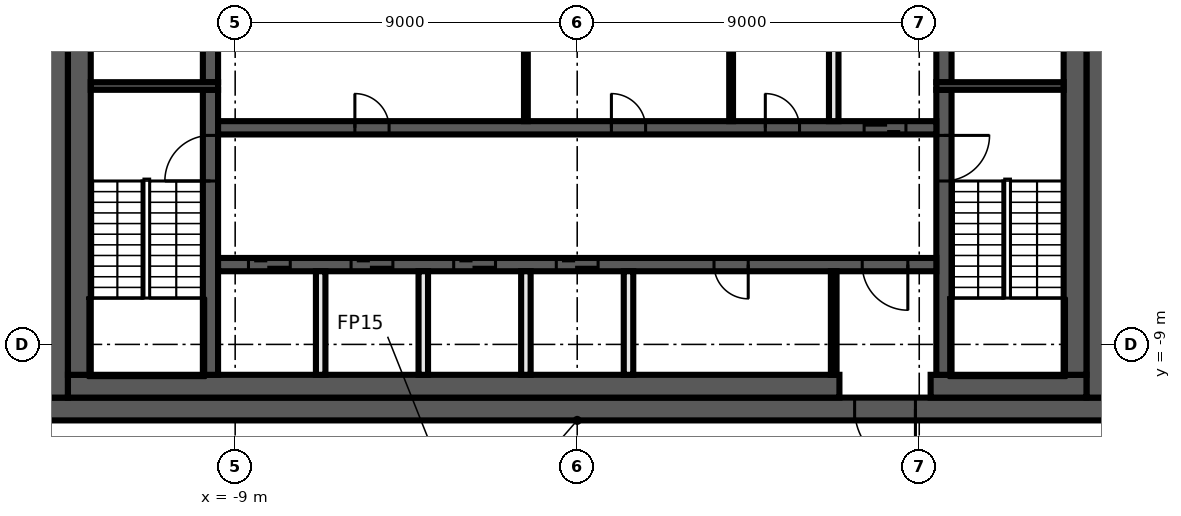
"""IFC4 building model, lengths in metres.
Left out: names, types, materials, properties, quantities, classifications, styles, units other than length and angle.
Written with IfcOpenShell. Run it as: python <this file> out.ifc"""

import sys

from ifc_helpers import new_model, si_unit, direction, frame, frame_2d, origin, place, context, subcontext, project, spatial, rectangle, extrude, element, fill, save


model = new_model("IFC4")
c1 = context("Model", 3, precision=1e-05, world=origin(), true_north=direction((0.0, 1.0)))
c2 = subcontext(c1, "Body", "Model", "MODEL_VIEW")
j1 = project(units=[si_unit("LENGTHUNIT", "METRE"), si_unit("PLANEANGLEUNIT", "RADIAN")], contexts=[c1])
p1 = place(None, origin())
s1 = spatial("IfcSite", under=j1, at=p1, CompositionType="ELEMENT")
p2 = place(p1, origin())
s2 = spatial("IfcBuilding", under=s1, at=p2, CompositionType="ELEMENT")
p3 = place(p2, frame((0.0, 0.0, 315.2)))
s3 = spatial("IfcBuildingStorey", under=s2, at=p3, CompositionType="ELEMENT", Elevation=315.2)
p4 = place(p3, frame((14.0, -10.7, 0.0), z_axis=(0.0, 0.0, 1.0), x_axis=(-1.0, 0.0, 0.0)))
e1 = element("IfcWall", 1, at=p4, inside=s3, PredefinedType="SHEAR", context=c2, shape_type="SweptSolid", body=[
    extrude(rectangle(XDim=28.0, YDim=0.6, at=frame_2d((14.0, 0.0))), origin(), (0.0, 0.0, 1.0), 3.82),
])
p5 = place(p4, frame((5.1, 0.0, 0.0)))
e2 = element("IfcOpeningElement", 2, at=p5, cuts=e1, PredefinedType="OPENING", context=c2, shape_type="SweptSolid", body=[
    extrude(rectangle(XDim=1.6, YDim=2.1, at=frame_2d((0.8, 1.05))), frame((0.0, 0.31, 0.0), z_axis=(0.0, -1.0, 0.0), x_axis=(1.0, 0.0, 0.0)), (0.0, 0.0, 1.0), 0.62),
])
for number, where, z_axis, x_axis in (
    (3, (13.7, 10.4, 0.0), (0.0, 0.0, 1.0), (0.0, -1.0, 0.0)),
    (4, (-13.7, -10.4, 0.0), (0.0, 0.0, 1.0), (0.0, 1.0, 0.0)),
):
    element("IfcWall", number, at=place(p3, frame(where, z_axis=z_axis, x_axis=x_axis)), inside=s3, PredefinedType="SHEAR", context=c2, shape_type="SweptSolid", body=[
        extrude(rectangle(XDim=20.8, YDim=0.6, at=frame_2d((10.4, 0.0))), origin(), (0.0, 0.0, 1.0), 3.82),
    ])
p6 = place(p3, frame((13.4, -10.1, 0.0), z_axis=(0.0, 0.0, 1.0), x_axis=(-1.0, 0.0, 0.0)))
e5 = element("IfcWall", 5, at=p6, inside=s3, PredefinedType="SHEAR", context=c2, shape_type="SweptSolid", body=[
    extrude(rectangle(XDim=4.1, YDim=0.6, at=frame_2d((2.05, 0.0))), origin(), (0.0, 0.0, 1.0), 3.82),
])
p7 = place(p3, frame((6.9, -10.1, 0.0), z_axis=(0.0, 0.0, 1.0), x_axis=(-1.0, 0.0, 0.0)))
e6 = element("IfcWall", 6, at=p7, inside=s3, PredefinedType="SHEAR", context=c2, shape_type="SweptSolid", body=[
    extrude(rectangle(XDim=20.3, YDim=0.6, at=frame_2d((10.15, 0.0))), origin(), (0.0, 0.0, 1.0), 3.82),
])
for number, where, z_axis, x_axis in (
    (7, (13.1, 9.8, 0.0), (0.0, 0.0, 1.0), (0.0, -1.0, 0.0)),
    (8, (-13.1, -9.8, 0.0), (0.0, 0.0, 1.0), (0.0, 1.0, 0.0)),
):
    element("IfcWall", number, at=place(p3, frame(where, z_axis=z_axis, x_axis=x_axis)), inside=s3, PredefinedType="SHEAR", context=c2, shape_type="SweptSolid", body=[
        extrude(rectangle(XDim=19.6, YDim=0.6, at=frame_2d((9.8, 0.0))), origin(), (0.0, 0.0, 1.0), 3.82),
    ])
p8 = place(p3, frame((9.65, -2.3, 0.0), z_axis=(0.0, 0.0, 1.0), x_axis=(0.0, -1.0, 0.0)))
e9 = element("IfcWall", 9, at=p8, inside=s3, PredefinedType="SHEAR", context=c2, shape_type="SweptSolid", body=[
    extrude(rectangle(XDim=7.5, YDim=0.4, at=frame_2d((3.75, 0.0))), origin(), (0.0, 0.0, 1.0), 3.82),
])
p9 = place(p8, frame((1.2, 0.0, 0.0)))
e10 = element("IfcOpeningElement", 10, at=p9, cuts=e9, PredefinedType="OPENING", context=c2, shape_type="SweptSolid", body=[
    extrude(rectangle(XDim=1.2, YDim=2.1, at=frame_2d((0.6, 1.05))), frame((0.0, 0.21, 0.0), z_axis=(0.0, -1.0, 0.0), x_axis=(1.0, 0.0, 0.0)), (0.0, 0.0, 1.0), 0.42),
])
p10 = place(p3, frame((9.65, 2.1, 0.0), z_axis=(0.0, 0.0, 1.0), x_axis=(0.0, -1.0, 0.0)))
e11 = element("IfcWall", 11, at=p10, inside=s3, PredefinedType="SHEAR", context=c2, shape_type="SweptSolid", body=[
    extrude(rectangle(XDim=4.2, YDim=0.4, at=frame_2d((2.1, 0.0))), origin(), (0.0, 0.0, 1.0), 3.82),
])
p11 = place(p10, frame((0.15, 0.0, 0.0)))
e12 = element("IfcOpeningElement", 12, at=p11, cuts=e11, PredefinedType="OPENING", context=c2, shape_type="SweptSolid", body=[
    extrude(rectangle(XDim=0.9, YDim=2.1, at=frame_2d((0.45, 1.05))), frame((0.0, 0.21, 0.0), z_axis=(0.0, -1.0, 0.0), x_axis=(1.0, 0.0, 0.0)), (0.0, 0.0, 1.0), 0.42),
])
p12 = place(p3, frame((-9.65, -9.8, 0.0), z_axis=(0.0, 0.0, 1.0), x_axis=(0.0, 1.0, 0.0)))
e13 = element("IfcWall", 13, at=p12, inside=s3, PredefinedType="SHEAR", context=c2, shape_type="SweptSolid", body=[
    extrude(rectangle(XDim=7.5, YDim=0.4, at=frame_2d((3.75, 0.0))), origin(), (0.0, 0.0, 1.0), 3.82),
])
p13 = place(p12, frame((5.1, 0.0, 0.0)))
e14 = element("IfcOpeningElement", 14, at=p13, cuts=e13, PredefinedType="OPENING", context=c2, shape_type="SweptSolid", body=[
    extrude(rectangle(XDim=1.2, YDim=2.1, at=frame_2d((0.6, 1.05))), frame((0.0, 0.21, 0.0), z_axis=(0.0, -1.0, 0.0), x_axis=(1.0, 0.0, 0.0)), (0.0, 0.0, 1.0), 0.42),
])
p14 = place(p3, frame((-9.65, -2.1, 0.0), z_axis=(0.0, 0.0, 1.0), x_axis=(0.0, 1.0, 0.0)))
e15 = element("IfcWall", 15, at=p14, inside=s3, PredefinedType="SHEAR", context=c2, shape_type="SweptSolid", body=[
    extrude(rectangle(XDim=4.2, YDim=0.4, at=frame_2d((2.1, 0.0))), origin(), (0.0, 0.0, 1.0), 3.82),
])
for number, where, z_axis, x_axis in (
    (16, (9.45, -2.2, 0.0), (0.0, 0.0, 1.0), (1.0, 0.0, 0.0)),
    (17, (-9.45, -2.2, 0.0), (0.0, 0.0, 1.0), (-1.0, 0.0, 0.0)),
):
    element("IfcWall", number, at=place(p3, frame(where, z_axis=z_axis, x_axis=x_axis)), inside=s3, PredefinedType="SHEAR", context=c2, shape_type="SweptSolid", body=[
        extrude(rectangle(XDim=3.35, YDim=0.2, at=frame_2d((1.675, 0.0))), origin(), (0.0, 0.0, 1.0), 3.82),
    ])
p15 = place(p3, frame((-9.45, -3.3, 0.0), z_axis=(0.0, 0.0, 1.0), x_axis=(1.0, 0.0, 0.0)))
e18 = element("IfcWall", 18, at=p15, inside=s3, PredefinedType="SHEAR", context=c2, shape_type="SweptSolid", body=[
    extrude(rectangle(XDim=18.9, YDim=0.35, at=frame_2d((9.45, 0.0))), origin(), (0.0, 0.0, 1.0), 3.82),
])
p16 = place(p15, frame((17.0, 0.0, 0.0)))
e19 = element("IfcOpeningElement", 19, at=p16, cuts=e18, PredefinedType="OPENING", context=c2, shape_type="SweptSolid", body=[
    extrude(rectangle(XDim=1.1, YDim=2.1, at=frame_2d((0.55, 1.05))), frame((0.0, 0.185, 0.0), z_axis=(0.0, -1.0, 0.0), x_axis=(1.0, 0.0, 0.0)), (0.0, 0.0, 1.0), 0.37),
])
p17 = place(p15, frame((3.6, 0.0, 0.0)))
e20 = element("IfcOpeningElement", 20, at=p17, cuts=e18, PredefinedType="OPENING", context=c2, shape_type="SweptSolid", body=[
    extrude(rectangle(XDim=0.9, YDim=2.1, at=frame_2d((0.45, 1.05))), frame((0.0, 0.185, 0.0), z_axis=(0.0, -1.0, 0.0), x_axis=(1.0, 0.0, 0.0)), (0.0, 0.0, 1.0), 0.37),
])
p18 = place(p15, frame((10.35, 0.0, 0.0)))
e21 = element("IfcOpeningElement", 21, at=p18, cuts=e18, PredefinedType="OPENING", context=c2, shape_type="SweptSolid", body=[
    extrude(rectangle(XDim=0.9, YDim=2.1, at=frame_2d((0.45, 1.05))), frame((0.0, 0.185, 0.0), z_axis=(0.0, -1.0, 0.0), x_axis=(1.0, 0.0, 0.0)), (0.0, 0.0, 1.0), 0.37),
])
p19 = place(p15, frame((14.4, 0.0, 0.0)))
e22 = element("IfcOpeningElement", 22, at=p19, cuts=e18, PredefinedType="OPENING", context=c2, shape_type="SweptSolid", body=[
    extrude(rectangle(XDim=0.9, YDim=2.1, at=frame_2d((0.45, 1.05))), frame((0.0, 0.185, 0.0), z_axis=(0.0, -1.0, 0.0), x_axis=(1.0, 0.0, 0.0)), (0.0, 0.0, 1.0), 0.37),
])
p20 = place(p3, frame((9.45, -6.9, 0.0), z_axis=(0.0, 0.0, 1.0), x_axis=(-1.0, 0.0, 0.0)))
e23 = element("IfcWall", 23, at=p20, inside=s3, PredefinedType="SHEAR", context=c2, shape_type="SweptSolid", body=[
    extrude(rectangle(XDim=18.9, YDim=0.35, at=frame_2d((9.45, 0.0))), origin(), (0.0, 0.0, 1.0), 3.82),
])
p21 = place(p20, frame((17.0, 0.0, 0.0)))
e24 = element("IfcOpeningElement", 24, at=p21, cuts=e23, PredefinedType="OPENING", context=c2, shape_type="SweptSolid", body=[
    extrude(rectangle(XDim=1.1, YDim=2.1, at=frame_2d((0.55, 1.05))), frame((0.0, 0.185, 0.0), z_axis=(0.0, -1.0, 0.0), x_axis=(1.0, 0.0, 0.0)), (0.0, 0.0, 1.0), 0.37),
])
p22 = place(p20, frame((14.3, 0.0, 0.0)))
e25 = element("IfcOpeningElement", 25, at=p22, cuts=e23, PredefinedType="OPENING", context=c2, shape_type="SweptSolid", body=[
    extrude(rectangle(XDim=1.1, YDim=2.1, at=frame_2d((0.55, 1.05))), frame((0.0, 0.185, 0.0), z_axis=(0.0, -1.0, 0.0), x_axis=(1.0, 0.0, 0.0)), (0.0, 0.0, 1.0), 0.37),
])
p23 = place(p20, frame((11.6, 0.0, 0.0)))
e26 = element("IfcOpeningElement", 26, at=p23, cuts=e23, PredefinedType="OPENING", context=c2, shape_type="SweptSolid", body=[
    extrude(rectangle(XDim=1.1, YDim=2.1, at=frame_2d((0.55, 1.05))), frame((0.0, 0.185, 0.0), z_axis=(0.0, -1.0, 0.0), x_axis=(1.0, 0.0, 0.0)), (0.0, 0.0, 1.0), 0.37),
])
p24 = place(p20, frame((8.9, 0.0, 0.0)))
e27 = element("IfcOpeningElement", 27, at=p24, cuts=e23, PredefinedType="OPENING", context=c2, shape_type="SweptSolid", body=[
    extrude(rectangle(XDim=1.1, YDim=2.1, at=frame_2d((0.55, 1.05))), frame((0.0, 0.185, 0.0), z_axis=(0.0, -1.0, 0.0), x_axis=(1.0, 0.0, 0.0)), (0.0, 0.0, 1.0), 0.37),
])
p25 = place(p20, frame((0.75, 0.0, 0.0)))
e28 = element("IfcOpeningElement", 28, at=p25, cuts=e23, PredefinedType="OPENING", context=c2, shape_type="SweptSolid", body=[
    extrude(rectangle(XDim=1.2, YDim=2.1, at=frame_2d((0.6, 1.05))), frame((0.0, 0.185, 0.0), z_axis=(0.0, -1.0, 0.0), x_axis=(1.0, 0.0, 0.0)), (0.0, 0.0, 1.0), 0.37),
])
p26 = place(p20, frame((4.95, 0.0, 0.0)))
e29 = element("IfcOpeningElement", 29, at=p26, cuts=e23, PredefinedType="OPENING", context=c2, shape_type="SweptSolid", body=[
    extrude(rectangle(XDim=0.9, YDim=2.1, at=frame_2d((0.45, 1.05))), frame((0.0, 0.185, 0.0), z_axis=(0.0, -1.0, 0.0), x_axis=(1.0, 0.0, 0.0)), (0.0, 0.0, 1.0), 0.37),
])
p27 = place(p3, frame((6.75, -9.8, 0.0), z_axis=(0.0, 0.0, 1.0), x_axis=(0.0, 1.0, 0.0)))
e30 = element("IfcWall", 30, at=p27, inside=s3, PredefinedType="PARTITIONING", context=c2, shape_type="SweptSolid", body=[
    extrude(rectangle(XDim=2.725, YDim=0.15, at=frame_2d((1.363, 0.0))), origin(), (0.0, 0.0, 1.0), 3.82),
])
p28 = place(p3, frame((6.75, -3.125, 0.0), z_axis=(0.0, 0.0, 1.0), x_axis=(0.0, 1.0, 0.0)))
e31 = element("IfcWall", 31, at=p28, inside=s3, PredefinedType="SOLIDWALL", context=c2, shape_type="SweptSolid", body=[
    extrude(rectangle(XDim=2.725, YDim=0.25, at=frame_2d((1.363, 0.0))), origin(), (0.0, 0.0, 1.0), 3.82),
])
p29 = place(p3, frame((4.05, -3.125, 0.0), z_axis=(0.0, 0.0, 1.0), x_axis=(0.0, 1.0, 0.0)))
e32 = element("IfcWall", 32, at=p29, inside=s3, PredefinedType="PARTITIONING", context=c2, shape_type="SweptSolid", body=[
    extrude(rectangle(XDim=2.725, YDim=0.1, at=frame_2d((1.363, 0.0))), origin(), (0.0, 0.0, 1.0), 3.82),
])
p30 = place(p3, frame((1.35, -9.8, 0.0), z_axis=(0.0, 0.0, 1.0), x_axis=(0.0, 1.0, 0.0)))
e33 = element("IfcWall", 33, at=p30, inside=s3, PredefinedType="SOLIDWALL", context=c2, shape_type="SweptSolid", body=[
    extrude(rectangle(XDim=2.725, YDim=0.25, at=frame_2d((1.363, 0.0))), origin(), (0.0, 0.0, 1.0), 3.82),
])
p31 = place(p3, frame((-1.35, -3.125, 0.0), z_axis=(0.0, 0.0, 1.0), x_axis=(0.0, 1.0, 0.0)))
e34 = element("IfcWall", 34, at=p31, inside=s3, PredefinedType="PARTITIONING", context=c2, shape_type="SweptSolid", body=[
    extrude(rectangle(XDim=2.725, YDim=0.1, at=frame_2d((1.363, 0.0))), origin(), (0.0, 0.0, 1.0), 3.82),
])
for number, where, z_axis, x_axis in (
    (35, (-1.35, -9.8, 0.0), (0.0, 0.0, 1.0), (0.0, 1.0, 0.0)),
    (36, (-4.05, -9.8, 0.0), (0.0, 0.0, 1.0), (0.0, 1.0, 0.0)),
    (37, (-6.75, -9.8, 0.0), (0.0, 0.0, 1.0), (0.0, 1.0, 0.0)),
):
    element("IfcWall", number, at=place(p3, frame(where, z_axis=z_axis, x_axis=x_axis)), inside=s3, PredefinedType="SOLIDWALL", context=c2, shape_type="SweptSolid", body=[
        extrude(rectangle(XDim=2.725, YDim=0.25, at=frame_2d((1.363, 0.0))), origin(), (0.0, 0.0, 1.0), 3.82),
    ])
p32 = place(p16, origin())
e38 = element("IfcDoor", 38, at=p32, inside=s3, OperationType="DOUBLE_DOOR_SLIDING", PredefinedType="DOOR", context=c2, shape_type="SweptSolid", body=[
    extrude(rectangle(XDim=1.1, YDim=2.1, at=frame_2d((0.55, 1.05))), frame((0.0, 0.025, 0.0), z_axis=(0.0, -1.0, 0.0), x_axis=(1.0, 0.0, 0.0)), (0.0, 0.0, 1.0), 0.05),
])
fill(e19, e38)
p33 = place(p21, origin())
e39 = element("IfcDoor", 39, at=p33, inside=s3, OperationType="DOUBLE_DOOR_SLIDING", PredefinedType="DOOR", context=c2, shape_type="SweptSolid", body=[
    extrude(rectangle(XDim=1.1, YDim=2.1, at=frame_2d((0.55, 1.05))), frame((0.0, 0.025, 0.0), z_axis=(0.0, -1.0, 0.0), x_axis=(1.0, 0.0, 0.0)), (0.0, 0.0, 1.0), 0.05),
])
fill(e24, e39)
p34 = place(p22, origin())
e40 = element("IfcDoor", 40, at=p34, inside=s3, OperationType="DOUBLE_DOOR_SLIDING", PredefinedType="DOOR", context=c2, shape_type="SweptSolid", body=[
    extrude(rectangle(XDim=1.1, YDim=2.1, at=frame_2d((0.55, 1.05))), frame((0.0, 0.025, 0.0), z_axis=(0.0, -1.0, 0.0), x_axis=(1.0, 0.0, 0.0)), (0.0, 0.0, 1.0), 0.05),
])
fill(e25, e40)
p35 = place(p23, origin())
e41 = element("IfcDoor", 41, at=p35, inside=s3, OperationType="DOUBLE_DOOR_SLIDING", PredefinedType="DOOR", context=c2, shape_type="SweptSolid", body=[
    extrude(rectangle(XDim=1.1, YDim=2.1, at=frame_2d((0.55, 1.05))), frame((0.0, 0.025, 0.0), z_axis=(0.0, -1.0, 0.0), x_axis=(1.0, 0.0, 0.0)), (0.0, 0.0, 1.0), 0.05),
])
fill(e26, e41)
p36 = place(p24, origin())
e42 = element("IfcDoor", 42, at=p36, inside=s3, OperationType="DOUBLE_DOOR_SLIDING", PredefinedType="DOOR", context=c2, shape_type="SweptSolid", body=[
    extrude(rectangle(XDim=1.1, YDim=2.1, at=frame_2d((0.55, 1.05))), frame((0.0, 0.025, 0.0), z_axis=(0.0, -1.0, 0.0), x_axis=(1.0, 0.0, 0.0)), (0.0, 0.0, 1.0), 0.05),
])
fill(e27, e42)
p37 = place(p5, origin())
e43 = element("IfcDoor", 43, at=p37, inside=s3, OperationType="DOUBLE_DOOR_SINGLE_SWING", PredefinedType="DOOR", context=c2, shape_type="SweptSolid", body=[
    extrude(rectangle(XDim=1.6, YDim=2.1, at=frame_2d((0.8, 1.05))), frame((0.0, 0.025, 0.0), z_axis=(0.0, -1.0, 0.0), x_axis=(1.0, 0.0, 0.0)), (0.0, 0.0, 1.0), 0.05),
])
fill(e2, e43)
p38 = place(p25, origin())
e44 = element("IfcDoor", 44, at=p38, inside=s3, OperationType="SINGLE_SWING_LEFT", PredefinedType="DOOR", context=c2, shape_type="SweptSolid", body=[
    extrude(rectangle(XDim=1.2, YDim=2.1, at=frame_2d((0.6, 1.05))), frame((0.0, 0.025, 0.0), z_axis=(0.0, -1.0, 0.0), x_axis=(1.0, 0.0, 0.0)), (0.0, 0.0, 1.0), 0.05),
])
fill(e28, e44)
p39 = place(p17, origin())
e45 = element("IfcDoor", 45, at=p39, inside=s3, OperationType="SINGLE_SWING_RIGHT", PredefinedType="DOOR", context=c2, shape_type="SweptSolid", body=[
    extrude(rectangle(XDim=0.9, YDim=2.1, at=frame_2d((0.45, 1.05))), frame((0.0, 0.025, 0.0), z_axis=(0.0, -1.0, 0.0), x_axis=(1.0, 0.0, 0.0)), (0.0, 0.0, 1.0), 0.05),
])
fill(e20, e45)
p40 = place(p18, origin())
e46 = element("IfcDoor", 46, at=p40, inside=s3, OperationType="SINGLE_SWING_LEFT", PredefinedType="DOOR", context=c2, shape_type="SweptSolid", body=[
    extrude(rectangle(XDim=0.9, YDim=2.1, at=frame_2d((0.45, 1.05))), frame((0.0, 0.025, 0.0), z_axis=(0.0, -1.0, 0.0), x_axis=(1.0, 0.0, 0.0)), (0.0, 0.0, 1.0), 0.05),
])
fill(e21, e46)
p41 = place(p19, origin())
e47 = element("IfcDoor", 47, at=p41, inside=s3, OperationType="SINGLE_SWING_RIGHT", PredefinedType="DOOR", context=c2, shape_type="SweptSolid", body=[
    extrude(rectangle(XDim=0.9, YDim=2.1, at=frame_2d((0.45, 1.05))), frame((0.0, 0.025, 0.0), z_axis=(0.0, -1.0, 0.0), x_axis=(1.0, 0.0, 0.0)), (0.0, 0.0, 1.0), 0.05),
])
fill(e22, e47)
p42 = place(p26, origin())
e48 = element("IfcDoor", 48, at=p42, inside=s3, OperationType="SINGLE_SWING_LEFT", PredefinedType="DOOR", context=c2, shape_type="SweptSolid", body=[
    extrude(rectangle(XDim=0.9, YDim=2.1, at=frame_2d((0.45, 1.05))), frame((0.0, 0.025, 0.0), z_axis=(0.0, -1.0, 0.0), x_axis=(1.0, 0.0, 0.0)), (0.0, 0.0, 1.0), 0.05),
])
fill(e29, e48)
p43 = place(p9, origin())
e49 = element("IfcDoor", 49, at=p43, inside=s3, OperationType="SINGLE_SWING_RIGHT", PredefinedType="DOOR", context=c2, shape_type="SweptSolid", body=[
    extrude(rectangle(XDim=1.2, YDim=2.1, at=frame_2d((0.6, 1.05))), frame((0.0, 0.025, 0.0), z_axis=(0.0, -1.0, 0.0), x_axis=(1.0, 0.0, 0.0)), (0.0, 0.0, 1.0), 0.05),
])
fill(e10, e49)
p44 = place(p13, origin())
e50 = element("IfcDoor", 50, at=p44, inside=s3, OperationType="SINGLE_SWING_LEFT", PredefinedType="DOOR", context=c2, shape_type="SweptSolid", body=[
    extrude(rectangle(XDim=1.2, YDim=2.1, at=frame_2d((0.6, 1.05))), frame((0.0, 0.025, 0.0), z_axis=(0.0, -1.0, 0.0), x_axis=(1.0, 0.0, 0.0)), (0.0, 0.0, 1.0), 0.05),
])
fill(e14, e50)
save(model, sys.argv[1])
